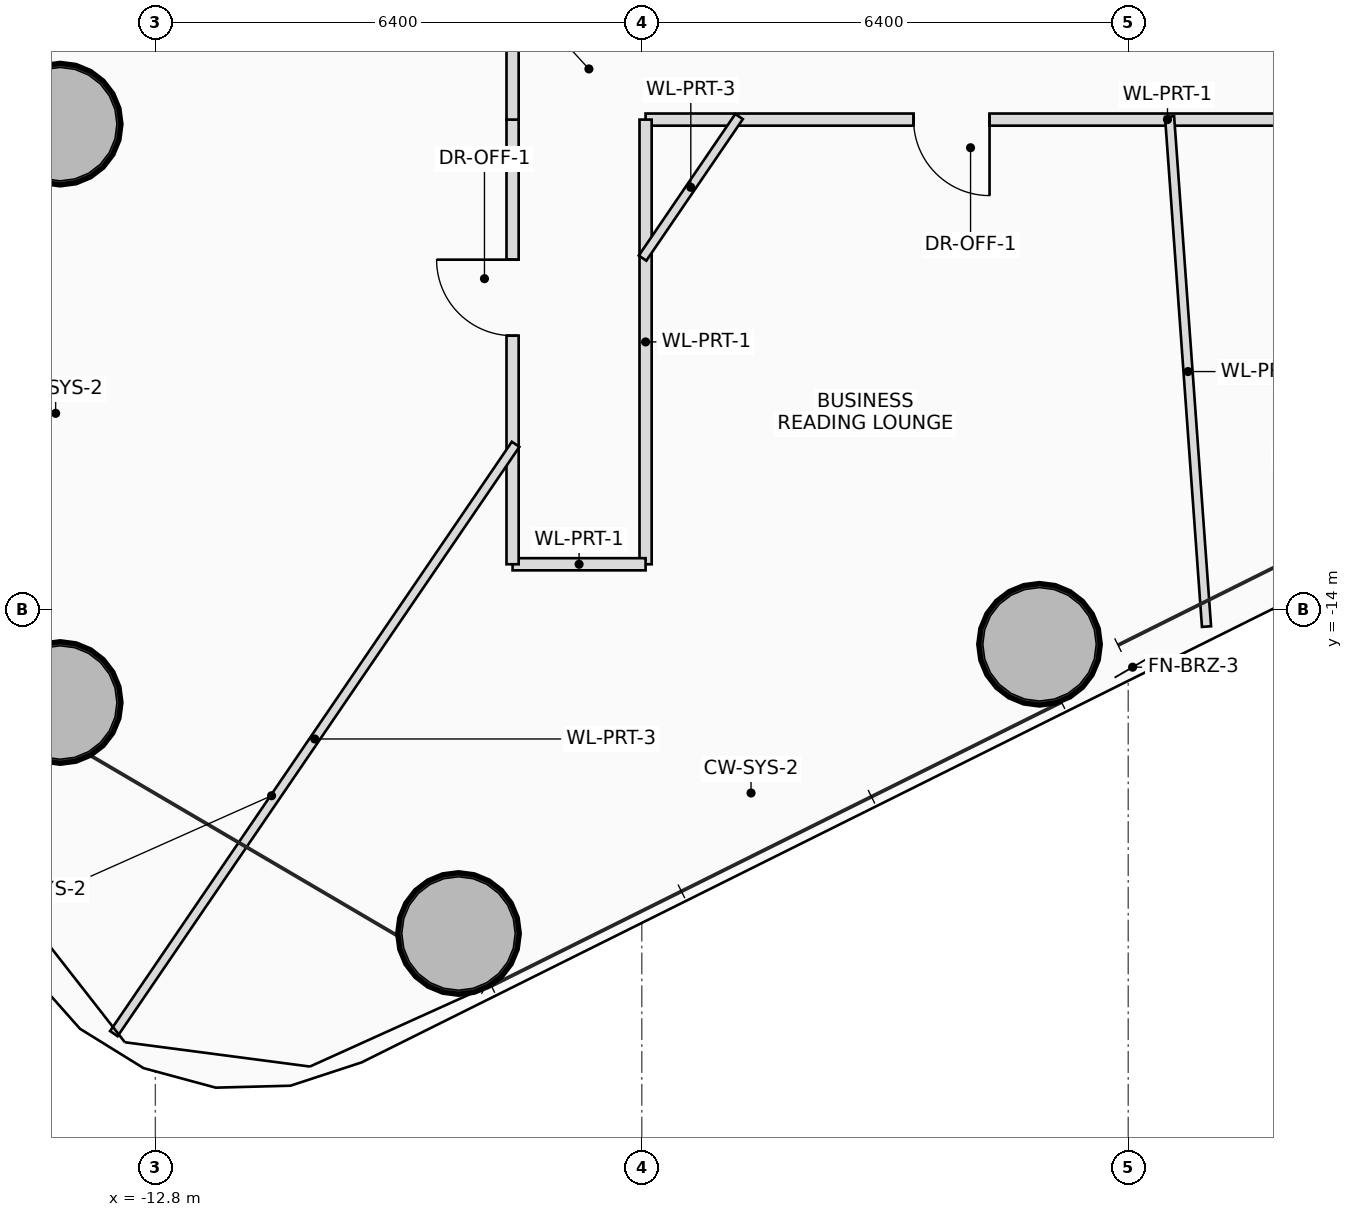
"""IFC4 building model, lengths in metres.
Left out: names, types, materials, properties, quantities, classifications, styles, units other than length and angle.
Written with IfcOpenShell. Run it as: python <this file> out.ifc"""

import sys

from ifc_helpers import new_model, si_unit, direction, frame, frame_2d, origin, origin_2d, place, context, subcontext, project, spatial, rectangle, hollow_circle, extrude, source, transform, mapped, element, fill, save


model = new_model("IFC4")
c1 = context("Model", 3, precision=1e-05, world=origin(), true_north=direction((0.0, 1.0)))
c2 = subcontext(c1, "Body", "Model", "MODEL_VIEW")
j1 = project(units=[si_unit("LENGTHUNIT", "METRE"), si_unit("PLANEANGLEUNIT", "RADIAN")], contexts=[c1])
p1 = place(None, origin())
s1 = spatial("IfcSite", under=j1, at=p1, CompositionType="ELEMENT")
p2 = place(p1, origin())
s2 = spatial("IfcBuilding", under=s1, at=p2, CompositionType="ELEMENT")
p3 = place(p2, frame((0.0, 0.0, 34.9)))
s3 = spatial("IfcBuildingStorey", under=s2, at=p3, CompositionType="ELEMENT", Elevation=34.9)
m1 = source(origin(), c2, "Body", "SweptSolid", [
    extrude(hollow_circle(Radius=0.8, WallThickness=0.055, at=origin_2d()), origin(), (0.0, 0.0, 1.0), 3.7),
])
for number, where, z_axis, x_axis in (
    (1, (-8.812, -18.258, 0.0), (0.0, 0.0, 1.0), (1.0, 0.0, 0.0)),
    (2, (-1.167, -14.453, 0.0), (0.0, 0.0, 1.0), (1.0, 0.0, 0.0)),
    (3, (-14.052, -7.61, 0.0), (0.0, 0.0, 1.0), (1.0, 0.0, 0.0)),
    (4, (-14.052, -15.219, 0.0), (0.0, 0.0, 1.0), (1.0, 0.0, 0.0)),
):
    element("IfcColumn", number, at=place(p3, frame(where, z_axis=z_axis, x_axis=x_axis)), inside=s3, PredefinedType="COLUMN", context=c2, shape_type="MappedRepresentation", body=[
        mapped(m1, transform((0.0, 0.0, 0.0), scale=1.0)),
    ])
p4 = place(p3, frame((6.35, -7.55, 0.0), z_axis=(0.0, 0.0, 1.0), x_axis=(-1.0, 0.0, 0.0)))
e5 = element("IfcWall", 5, at=p4, inside=s3, PredefinedType="PARTITIONING", context=c2, shape_type="SweptSolid", body=[
    extrude(rectangle(XDim=12.7, YDim=0.16, at=frame_2d((6.35, 0.0))), origin(), (0.0, 0.0, 1.0), 2.8),
])
p5 = place(p4, frame((2.493, 0.0, 0.0)))
e6 = element("IfcOpeningElement", 6, at=p5, cuts=e5, PredefinedType="OPENING", context=c2, shape_type="SweptSolid", body=[
    extrude(rectangle(XDim=1.0, YDim=2.25, at=frame_2d((0.5, 1.125))), frame((0.0, 0.09, 0.0), z_axis=(0.0, -1.0, 0.0), x_axis=(1.0, 0.0, 0.0)), (0.0, 0.0, 1.0), 0.18),
])
p6 = place(p4, frame((8.175, 0.0, 0.0)))
e7 = element("IfcOpeningElement", 7, at=p6, cuts=e5, PredefinedType="OPENING", context=c2, shape_type="SweptSolid", body=[
    extrude(rectangle(XDim=1.0, YDim=2.25, at=frame_2d((0.5, 1.125))), frame((0.0, 0.09, 0.0), z_axis=(0.0, -1.0, 0.0), x_axis=(1.0, 0.0, 0.0)), (0.0, 0.0, 1.0), 0.18),
])
p7 = place(p3, frame((-6.35, -7.55, 0.0), z_axis=(0.0, 0.0, 1.0), x_axis=(0.0, -1.0, 0.0)))
e8 = element("IfcWall", 8, at=p7, inside=s3, PredefinedType="PARTITIONING", context=c2, shape_type="SweptSolid", body=[
    extrude(rectangle(XDim=5.85, YDim=0.16, at=frame_2d((2.925, 0.0))), origin(), (0.0, 0.0, 1.0), 2.8),
])
p8 = place(p3, frame((-6.35, -13.4, 0.0), z_axis=(0.0, 0.0, 1.0), x_axis=(-1.0, 0.0, 0.0)))
e9 = element("IfcWall", 9, at=p8, inside=s3, PredefinedType="PARTITIONING", context=c2, shape_type="SweptSolid", body=[
    extrude(rectangle(XDim=1.75, YDim=0.16, at=frame_2d((0.875, 0.0))), origin(), (0.0, 0.0, 1.0), 2.8),
])
p9 = place(p3, frame((-8.1, -13.4, 0.0), z_axis=(0.0, 0.0, 1.0), x_axis=(0.0, 1.0, 0.0)))
e10 = element("IfcWall", 10, at=p9, inside=s3, PredefinedType="PARTITIONING", context=c2, shape_type="SweptSolid", body=[
    extrude(rectangle(XDim=5.85, YDim=0.16, at=frame_2d((2.925, 0.0))), origin(), (0.0, 0.0, 1.0), 2.8),
])
p10 = place(p9, frame((3.007, 0.0, 0.0)))
e11 = element("IfcOpeningElement", 11, at=p10, cuts=e10, PredefinedType="OPENING", context=c2, shape_type="SweptSolid", body=[
    extrude(rectangle(XDim=1.0, YDim=2.25, at=frame_2d((0.5, 1.125))), frame((0.0, 0.09, 0.0), z_axis=(0.0, -1.0, 0.0), x_axis=(1.0, 0.0, 0.0)), (0.0, 0.0, 1.0), 0.18),
])
p11 = place(p3, frame((-8.1, -7.55, 0.0), z_axis=(0.0, 0.0, 1.0), x_axis=(0.0, 1.0, 0.0)))
e12 = element("IfcWall", 12, at=p11, inside=s3, PredefinedType="PARTITIONING", context=c2, shape_type="SweptSolid", body=[
    extrude(rectangle(XDim=15.1, YDim=0.16, at=frame_2d((7.55, 0.0))), origin(), (0.0, 0.0, 1.0), 2.8),
])
p12 = place(p11, frame((11.285, 0.0, 0.0)))
e13 = element("IfcOpeningElement", 13, at=p12, cuts=e12, PredefinedType="OPENING", context=c2, shape_type="SweptSolid", body=[
    extrude(rectangle(XDim=1.0, YDim=2.25, at=frame_2d((0.5, 1.125))), frame((0.0, 0.09, 0.0), z_axis=(0.0, -1.0, 0.0), x_axis=(1.0, 0.0, 0.0)), (0.0, 0.0, 1.0), 0.18),
])
p13 = place(p3, frame((-5.12, -7.51, 0.0), z_axis=(0.0, 0.0, 1.0), x_axis=(-0.563343546536, -0.826222759657, 0.0)))
e14 = element("IfcWall", 14, at=p13, inside=s3, PredefinedType="PARTITIONING", context=c2, shape_type="SweptSolid", body=[
    extrude(rectangle(XDim=2.254, YDim=0.12, at=frame_2d((1.127, 0.0))), origin(), (0.0, 0.0, 1.0), 3.16),
])
p14 = place(p3, frame((-8.06, -11.822, 0.0), z_axis=(0.0, 0.0, 1.0), x_axis=(-0.56331583488, -0.826241653618, 0.0)))
e15 = element("IfcWall", 15, at=p14, inside=s3, PredefinedType="PARTITIONING", context=c2, shape_type="SweptSolid", body=[
    extrude(rectangle(XDim=9.384, YDim=0.12, at=frame_2d((4.692, 0.0))), origin(), (0.0, 0.0, 1.0), 2.96),
])
p15 = place(p3, frame((0.544, -7.51, 0.0), z_axis=(0.0, 0.0, 1.0), x_axis=(0.072255425025, -0.997386160699, 0.0)))
e16 = element("IfcWall", 16, at=p15, inside=s3, PredefinedType="PARTITIONING", context=c2, shape_type="SweptSolid", body=[
    extrude(rectangle(XDim=6.727, YDim=0.12, at=frame_2d((3.364, 0.0))), origin(), (0.0, 0.0, 1.0), 2.96),
])
p16 = place(p6, origin())
e17 = element("IfcDoor", 17, at=p16, inside=s3, OperationType="SINGLE_SWING_LEFT", PredefinedType="DOOR", context=c2, shape_type="SweptSolid", body=[
    extrude(rectangle(XDim=1.0, YDim=2.25, at=frame_2d((0.5, 1.125))), frame((0.0, 0.025, 0.0), z_axis=(0.0, -1.0, 0.0), x_axis=(1.0, 0.0, 0.0)), (0.0, 0.0, 1.0), 0.05),
])
fill(e7, e17)
p17 = place(p10, origin())
e18 = element("IfcDoor", 18, at=p17, inside=s3, OperationType="SINGLE_SWING_RIGHT", PredefinedType="DOOR", context=c2, shape_type="SweptSolid", body=[
    extrude(rectangle(XDim=1.0, YDim=2.25, at=frame_2d((0.5, 1.125))), frame((0.0, 0.025, 0.0), z_axis=(0.0, -1.0, 0.0), x_axis=(1.0, 0.0, 0.0)), (0.0, 0.0, 1.0), 0.05),
])
fill(e11, e18)
save(model, sys.argv[1])
